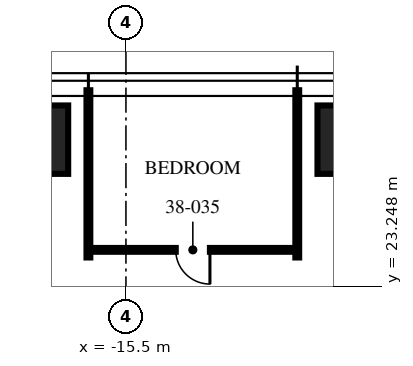
"""IFC4 building model, lengths in metres.
Left out: names, types, materials, properties, quantities, classifications, styles, units other than length and angle.
Written with IfcOpenShell. Run it as: python <this file> out.ifc"""

import sys

from ifc_helpers import new_model, si_unit, direction, frame, frame_2d, origin, origin_2d, place, context, subcontext, project, spatial, rectangle, extrude, element, fill, save


model = new_model("IFC4")
c1 = context("Model", 3, precision=1e-05, world=origin(), true_north=direction((0.0, 1.0)))
c2 = subcontext(c1, "Body", "Model", "MODEL_VIEW")
j1 = project(units=[si_unit("LENGTHUNIT", "METRE"), si_unit("PLANEANGLEUNIT", "RADIAN")], contexts=[c1])
p1 = place(None, origin())
s1 = spatial("IfcSite", under=j1, at=p1, CompositionType="ELEMENT")
p2 = place(p1, origin())
s2 = spatial("IfcBuilding", under=s1, at=p2, CompositionType="ELEMENT")
p3 = place(p2, frame((0.0, 0.0, 152.25)))
s3 = spatial("IfcBuildingStorey", under=s2, at=p3, CompositionType="ELEMENT", Elevation=152.25)
for number, where, z_axis, x_axis in (
    (1, (-18.32, 27.1, 0.0), (0.0, 0.0, 1.0), (1.0, 0.0, 0.0)),
    (2, (-9.16, 27.1, 0.0), (0.0, 0.0, 1.0), (1.0, 0.0, 0.0)),
):
    element("IfcColumn", number, at=place(p3, frame(where, z_axis=z_axis, x_axis=x_axis)), inside=s3, PredefinedType="COLUMN", context=c2, shape_type="SweptSolid", body=[
        extrude(rectangle(XDim=2.6, YDim=1.8, at=origin_2d()), origin(), (0.0, 0.0, 1.0), 3.75),
    ])
for number, where, z_axis, x_axis in (
    (3, (-10.992, 24.0, 0.0), (0.0, 0.0, 1.0), (0.0, 1.0, 0.0)),
    (4, (-16.488, 24.0, 0.0), (0.0, 0.0, 1.0), (0.0, 1.0, 0.0)),
):
    element("IfcWall", number, at=place(p3, frame(where, z_axis=z_axis, x_axis=x_axis)), inside=s3, PredefinedType="PARTITIONING", context=c2, shape_type="SweptSolid", body=[
        extrude(rectangle(XDim=4.4, YDim=0.1, at=frame_2d((2.2, 0.0))), origin(), (0.0, 0.0, 1.0), 2.81),
    ])
p4 = place(p3, frame((-10.992, 24.2, 0.0), z_axis=(0.0, 0.0, 1.0), x_axis=(-1.0, 0.0, 0.0)))
e5 = element("IfcWall", 5, at=p4, inside=s3, PredefinedType="PARTITIONING", context=c2, shape_type="SweptSolid", body=[
    extrude(rectangle(XDim=5.496, YDim=0.1, at=frame_2d((2.748, 0.0))), origin(), (0.0, 0.0, 1.0), 2.81),
])
p5 = place(p4, frame((2.298, 0.0, 0.0)))
e6 = element("IfcOpeningElement", 6, at=p5, cuts=e5, PredefinedType="OPENING", context=c2, shape_type="SweptSolid", body=[
    extrude(rectangle(XDim=0.9, YDim=2.1, at=frame_2d((0.45, 1.05))), frame((0.0, 0.06, 0.0), z_axis=(0.0, -1.0, 0.0), x_axis=(1.0, 0.0, 0.0)), (0.0, 0.0, 1.0), 0.12),
])
p6 = place(p5, origin())
e7 = element("IfcDoor", 7, at=p6, inside=s3, OperationType="SINGLE_SWING_LEFT", PredefinedType="DOOR", context=c2, shape_type="SweptSolid", body=[
    extrude(rectangle(XDim=0.9, YDim=2.1, at=frame_2d((0.45, 1.05))), frame((0.0, 0.025, 0.0), z_axis=(0.0, -1.0, 0.0), x_axis=(1.0, 0.0, 0.0)), (0.0, 0.0, 1.0), 0.05),
])
fill(e6, e7)
save(model, sys.argv[1])
